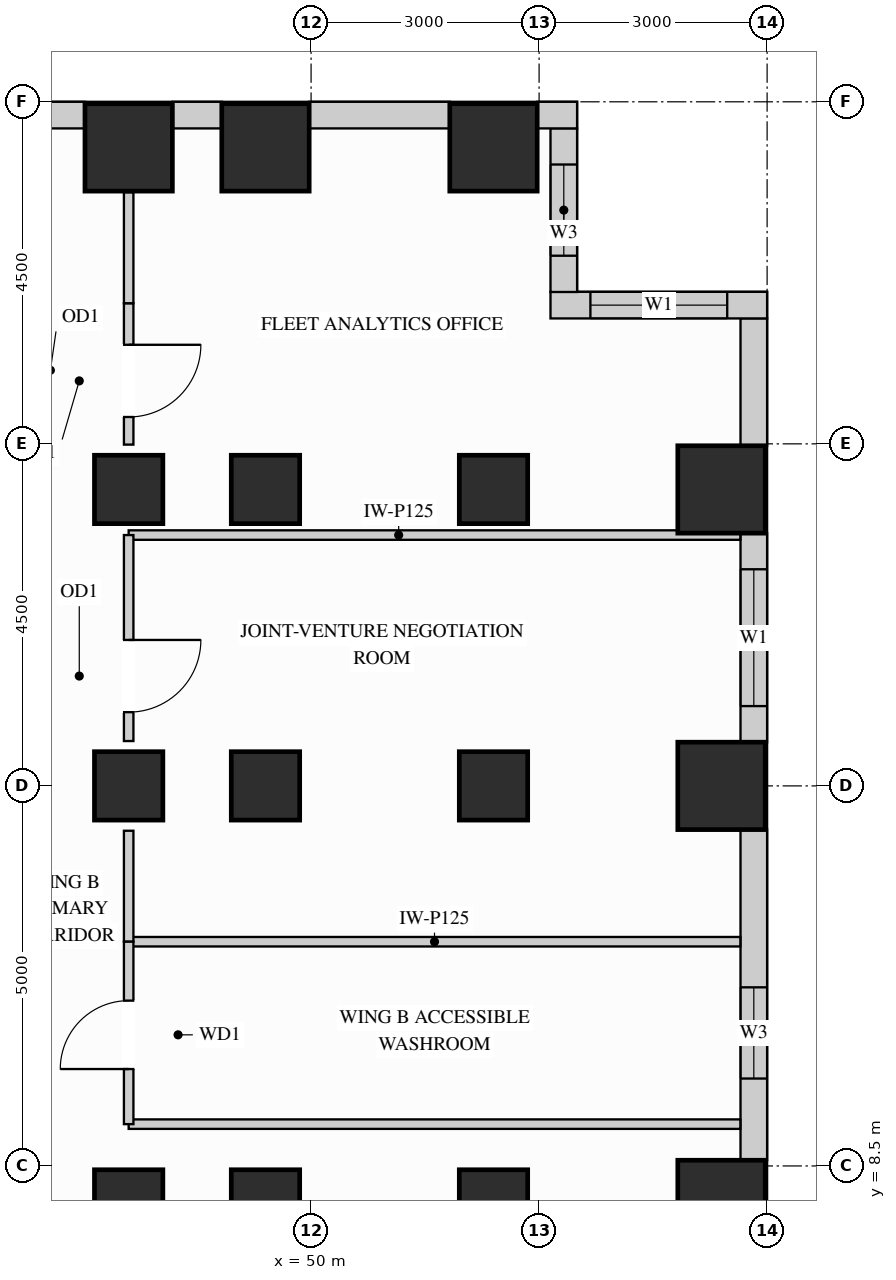
"""IFC4 building model, lengths in metres.
Left out: names, types, materials, properties, quantities, classifications, styles, units other than length and angle.
Written with IfcOpenShell. Run it as: python <this file> out.ifc"""

import sys

from ifc_helpers import new_model, si_unit, direction, frame, frame_2d, origin, origin_2d, place, context, subcontext, project, spatial, rectangle, extrude, source, transform, mapped, element, fill, save


model = new_model("IFC4")
c1 = context("Model", 3, precision=1e-05, world=origin(), true_north=direction((0.0, 1.0)))
c2 = subcontext(c1, "Body", "Model", "MODEL_VIEW")
j1 = project(units=[si_unit("LENGTHUNIT", "METRE"), si_unit("PLANEANGLEUNIT", "RADIAN")], contexts=[c1])
p1 = place(None, origin())
s1 = spatial("IfcSite", under=j1, at=p1, CompositionType="ELEMENT")
p2 = place(p1, origin())
s2 = spatial("IfcBuilding", under=s1, at=p2, CompositionType="ELEMENT")
p3 = place(p2, frame((0.0, 0.0, 124.2)))
s3 = spatial("IfcBuildingStorey", under=s2, at=p3, CompositionType="ELEMENT", Elevation=124.2)
m1 = source(origin(), c2, "Body", "SweptSolid", [
    extrude(rectangle(XDim=0.9, YDim=0.9, at=origin_2d()), origin(), (0.0, 0.0, 1.0), 3.38),
])
for number, where, z_axis, x_axis in (
    (1, (47.6, 13.5, 0.0), (0.0, 0.0, 1.0), (1.0, 0.0, 0.0)),
    (2, (47.6, 8.0, 0.0), (0.0, 0.0, 1.0), (1.0, 0.0, 0.0)),
    (3, (47.6, 17.4, 0.0), (0.0, 0.0, 1.0), (1.0, 0.0, 0.0)),
    (4, (49.4, 13.5, 0.0), (0.0, 0.0, 1.0), (1.0, 0.0, 0.0)),
    (5, (49.4, 17.4, 0.0), (0.0, 0.0, 1.0), (1.0, 0.0, 0.0)),
    (6, (49.4, 8.0, 0.0), (0.0, 0.0, 1.0), (1.0, 0.0, 0.0)),
    (7, (52.4, 13.5, 0.0), (0.0, 0.0, 1.0), (1.0, 0.0, 0.0)),
    (8, (52.4, 17.4, 0.0), (0.0, 0.0, 1.0), (1.0, 0.0, 0.0)),
    (9, (52.4, 8.0, 0.0), (0.0, 0.0, 1.0), (1.0, 0.0, 0.0)),
):
    element("IfcColumn", number, at=place(p3, frame(where, z_axis=z_axis, x_axis=x_axis)), inside=s3, PredefinedType="COLUMN", context=c2, shape_type="MappedRepresentation", body=[
        mapped(m1, transform((0.0, 0.0, 0.0), x_axis=(1.0, 0.0, 0.0), y_axis=(0.0, 1.0, 0.0), z_axis=(0.0, 0.0, 1.0))),
    ])
m2 = source(origin(), c2, "Body", "SweptSolid", [
    extrude(rectangle(XDim=1.15, YDim=1.15, at=origin_2d()), origin(), (0.0, 0.0, 1.0), 3.38),
])
for number, where, z_axis, x_axis in (
    (10, (47.6, 21.9, 0.0), (0.0, 0.0, 1.0), (1.0, 0.0, 0.0)),
    (11, (49.4, 21.9, 0.0), (0.0, 0.0, 1.0), (1.0, 0.0, 0.0)),
    (12, (52.4, 21.9, 0.0), (0.0, 0.0, 1.0), (1.0, 0.0, 0.0)),
    (13, (55.4, 13.5, 0.0), (0.0, 0.0, 1.0), (1.0, 0.0, 0.0)),
    (14, (55.4, 17.4, 0.0), (0.0, 0.0, 1.0), (1.0, 0.0, 0.0)),
    (15, (55.4, 8.0, 0.0), (0.0, 0.0, 1.0), (1.0, 0.0, 0.0)),
):
    element("IfcColumn", number, at=place(p3, frame(where, z_axis=z_axis, x_axis=x_axis)), inside=s3, PredefinedType="COLUMN", context=c2, shape_type="MappedRepresentation", body=[
        mapped(m2, transform((0.0, 0.0, 0.0), x_axis=(1.0, 0.0, 0.0), y_axis=(0.0, 1.0, 0.0), z_axis=(0.0, 0.0, 1.0))),
    ])
p4 = place(p3, frame((55.825, 8.573, 0.0), z_axis=(0.0, 0.0, 1.0), x_axis=(0.0, 1.0, 0.0)))
e16 = element("IfcWall", 16, at=p4, inside=s3, PredefinedType="SOLIDWALL", context=c2, shape_type="SweptSolid", body=[
    extrude(rectangle(XDim=4.354, YDim=0.35, at=frame_2d((2.177, 0.0))), origin(), (0.0, 0.0, 1.0), 3.365),
])
p5 = place(p4, frame((1.077, 0.0, 0.78)))
e17 = element("IfcOpeningElement", 17, at=p5, cuts=e16, PredefinedType="OPENING", context=c2, shape_type="SweptSolid", body=[
    extrude(rectangle(XDim=1.2, YDim=2.1, at=frame_2d((0.6, 1.05))), frame((0.0, 0.185, 0.0), z_axis=(0.0, -1.0, 0.0), x_axis=(1.0, 0.0, 0.0)), (0.0, 0.0, 1.0), 0.37),
])
p6 = place(p3, frame((55.825, 14.073, 0.0), z_axis=(0.0, 0.0, 1.0), x_axis=(0.0, 1.0, 0.0)))
e18 = element("IfcWall", 18, at=p6, inside=s3, PredefinedType="SOLIDWALL", context=c2, shape_type="SweptSolid", body=[
    extrude(rectangle(XDim=2.754, YDim=0.35, at=frame_2d((1.377, 0.0))), origin(), (0.0, 0.0, 1.0), 3.365),
])
p7 = place(p6, frame((0.477, 0.0, 0.78)))
e19 = element("IfcOpeningElement", 19, at=p7, cuts=e18, PredefinedType="OPENING", context=c2, shape_type="SweptSolid", body=[
    extrude(rectangle(XDim=1.8, YDim=2.1, at=frame_2d((0.9, 1.05))), frame((0.0, 0.185, 0.0), z_axis=(0.0, -1.0, 0.0), x_axis=(1.0, 0.0, 0.0)), (0.0, 0.0, 1.0), 0.37),
])
m3 = source(origin(), c2, "Body", "SweptSolid", [
    extrude(rectangle(XDim=1.679, YDim=0.35, at=frame_2d((0.84, 0.0))), origin(), (0.0, 0.0, 1.0), 3.365),
])
p8 = place(p3, frame((55.825, 17.973, 0.0), z_axis=(0.0, 0.0, 1.0), x_axis=(0.0, 1.0, 0.0)))
e20 = element("IfcWall", 20, at=p8, inside=s3, PredefinedType="SOLIDWALL", context=c2, shape_type="MappedRepresentation", body=[
    mapped(m3, transform((0.0, 0.0, 0.0), x_axis=(1.0, 0.0, 0.0), y_axis=(0.0, 1.0, 0.0), z_axis=(0.0, 0.0, 1.0))),
])
p9 = place(p3, frame((56.0, 19.825, 0.0), z_axis=(0.0, 0.0, 1.0), x_axis=(-1.0, 0.0, 0.0)))
e21 = element("IfcWall", 21, at=p9, inside=s3, PredefinedType="SOLIDWALL", context=c2, shape_type="SweptSolid", body=[
    extrude(rectangle(XDim=2.85, YDim=0.35, at=frame_2d((1.425, 0.0))), origin(), (0.0, 0.0, 1.0), 3.365),
])
p10 = place(p9, frame((0.525, 0.0, 0.78)))
e22 = element("IfcOpeningElement", 22, at=p10, cuts=e21, PredefinedType="OPENING", context=c2, shape_type="SweptSolid", body=[
    extrude(rectangle(XDim=1.8, YDim=2.1, at=frame_2d((0.9, 1.05))), frame((0.0, 0.185, 0.0), z_axis=(0.0, -1.0, 0.0), x_axis=(1.0, 0.0, 0.0)), (0.0, 0.0, 1.0), 0.37),
])
p11 = place(p3, frame((53.325, 19.998, 0.0), z_axis=(0.0, 0.0, 1.0), x_axis=(0.0, 1.0, 0.0)))
e23 = element("IfcWall", 23, at=p11, inside=s3, PredefinedType="SOLIDWALL", context=c2, shape_type="SweptSolid", body=[
    extrude(rectangle(XDim=2.154, YDim=0.35, at=frame_2d((1.077, 0.0))), origin(), (0.0, 0.0, 1.0), 3.365),
])
p12 = place(p11, frame((0.477, 0.0, 0.78)))
e24 = element("IfcOpeningElement", 24, at=p12, cuts=e23, PredefinedType="OPENING", context=c2, shape_type="SweptSolid", body=[
    extrude(rectangle(XDim=1.2, YDim=2.1, at=frame_2d((0.6, 1.05))), frame((0.0, 0.185, 0.0), z_axis=(0.0, -1.0, 0.0), x_axis=(1.0, 0.0, 0.0)), (0.0, 0.0, 1.0), 0.37),
])
m4 = source(origin(), c2, "Body", "SweptSolid", [
    extrude(rectangle(XDim=0.527, YDim=0.35, at=frame_2d((0.264, 0.0))), origin(), (0.0, 0.0, 1.0), 3.365),
])
p13 = place(p3, frame((53.5, 22.325, 0.0), z_axis=(0.0, 0.0, 1.0), x_axis=(-1.0, 0.0, 0.0)))
e25 = element("IfcWall", 25, at=p13, inside=s3, PredefinedType="SOLIDWALL", context=c2, shape_type="MappedRepresentation", body=[
    mapped(m4, transform((0.0, 0.0, 0.0), x_axis=(1.0, 0.0, 0.0), y_axis=(0.0, 1.0, 0.0), z_axis=(0.0, 0.0, 1.0))),
])
m5 = source(origin(), c2, "Body", "SweptSolid", [
    extrude(rectangle(XDim=1.854, YDim=0.35, at=frame_2d((0.927, 0.0))), origin(), (0.0, 0.0, 1.0), 3.365),
])
p14 = place(p3, frame((51.827, 22.325, 0.0), z_axis=(0.0, 0.0, 1.0), x_axis=(-1.0, 0.0, 0.0)))
e26 = element("IfcWall", 26, at=p14, inside=s3, PredefinedType="SOLIDWALL", context=c2, shape_type="MappedRepresentation", body=[
    mapped(m5, transform((0.0, 0.0, 0.0), x_axis=(1.0, 0.0, 0.0), y_axis=(0.0, 1.0, 0.0), z_axis=(0.0, 0.0, 1.0))),
])
m6 = source(origin(), c2, "Body", "SweptSolid", [
    extrude(rectangle(XDim=0.654, YDim=0.35, at=frame_2d((0.327, 0.0))), origin(), (0.0, 0.0, 1.0), 3.365),
])
p15 = place(p3, frame((48.827, 22.325, 0.0), z_axis=(0.0, 0.0, 1.0), x_axis=(-1.0, 0.0, 0.0)))
e27 = element("IfcWall", 27, at=p15, inside=s3, PredefinedType="SOLIDWALL", context=c2, shape_type="MappedRepresentation", body=[
    mapped(m6, transform((0.0, 0.0, 0.0), x_axis=(1.0, 0.0, 0.0), y_axis=(0.0, 1.0, 0.0), z_axis=(0.0, 0.0, 1.0))),
])
p16 = place(p3, frame((47.027, 22.325, 0.0), z_axis=(0.0, 0.0, 1.0), x_axis=(-1.0, 0.0, 0.0)))
e28 = element("IfcWall", 28, at=p16, inside=s3, PredefinedType="SOLIDWALL", context=c2, shape_type="SweptSolid", body=[
    extrude(rectangle(XDim=6.454, YDim=0.35, at=frame_2d((3.227, 0.0))), origin(), (0.0, 0.0, 1.0), 3.365),
])
p17 = place(p16, frame((1.749, 0.0, 0.78)))
e29 = element("IfcOpeningElement", 29, at=p17, cuts=e28, PredefinedType="OPENING", context=c2, shape_type="SweptSolid", body=[
    extrude(rectangle(XDim=1.8, YDim=2.1, at=frame_2d((0.9, 1.05))), frame((0.0, 0.185, 0.0), z_axis=(0.0, -1.0, 0.0), x_axis=(1.0, 0.0, 0.0)), (0.0, 0.0, 1.0), 0.37),
])
p18 = place(p16, frame((3.942, 0.0, 0.78)))
e30 = element("IfcOpeningElement", 30, at=p18, cuts=e28, PredefinedType="OPENING", context=c2, shape_type="SweptSolid", body=[
    extrude(rectangle(XDim=1.8, YDim=2.1, at=frame_2d((0.9, 1.05))), frame((0.0, 0.185, 0.0), z_axis=(0.0, -1.0, 0.0), x_axis=(1.0, 0.0, 0.0)), (0.0, 0.0, 1.0), 0.37),
])
m7 = source(origin(), c2, "Body", "SweptSolid", [
    extrude(rectangle(XDim=8.048, YDim=0.125, at=frame_2d((4.024, 0.0))), origin(), (0.0, 0.0, 1.0), 3.365),
])
for number, where, z_axis, x_axis in (
    (31, (47.6, 11.45, 0.0), (0.0, 0.0, 1.0), (1.0, 0.0, 0.0)),
    (32, (47.6, 16.8, 0.0), (0.0, 0.0, 1.0), (1.0, 0.0, 0.0)),
    (33, (47.6, 9.05, 0.0), (0.0, 0.0, 1.0), (1.0, 0.0, 0.0)),
):
    element("IfcWall", number, at=place(p3, frame(where, z_axis=z_axis, x_axis=x_axis)), inside=s3, PredefinedType="PARTITIONING", context=c2, shape_type="MappedRepresentation", body=[
        mapped(m7, transform((0.0, 0.0, 0.0), x_axis=(1.0, 0.0, 0.0), y_axis=(0.0, 1.0, 0.0), z_axis=(0.0, 0.0, 1.0))),
    ])
m8 = source(origin(), c2, "Body", "SweptSolid", [
    extrude(rectangle(XDim=1.46, YDim=0.125, at=frame_2d((0.73, 0.0))), origin(), (0.0, 0.0, 1.0), 2.677),
])
p19 = place(p3, frame((47.6, 11.45, 0.0), z_axis=(0.0, 0.0, 1.0), x_axis=(0.0, 1.0, 0.0)))
e34 = element("IfcWall", 34, at=p19, inside=s3, PredefinedType="PARTITIONING", context=c2, shape_type="MappedRepresentation", body=[
    mapped(m8, transform((0.0, 0.0, 0.0), x_axis=(1.0, 0.0, 0.0), y_axis=(0.0, 1.0, 0.0), z_axis=(0.0, 0.0, 1.0))),
])
p20 = place(p3, frame((47.6, 14.09, 0.0), z_axis=(0.0, 0.0, 1.0), x_axis=(0.0, 1.0, 0.0)))
e35 = element("IfcWall", 35, at=p20, inside=s3, PredefinedType="PARTITIONING", context=c2, shape_type="SweptSolid", body=[
    extrude(rectangle(XDim=2.71, YDim=0.125, at=frame_2d((1.355, 0.0))), origin(), (0.0, 0.0, 1.0), 2.677),
])
p21 = place(p20, frame((0.38, 0.0, 0.0)))
e36 = element("IfcOpeningElement", 36, at=p21, cuts=e35, PredefinedType="OPENING", context=c2, shape_type="SweptSolid", body=[
    extrude(rectangle(XDim=0.95, YDim=2.15, at=frame_2d((0.475, 1.075))), frame((0.0, 0.073, 0.0), z_axis=(0.0, -1.0, 0.0), x_axis=(1.0, 0.0, 0.0)), (0.0, 0.0, 1.0), 0.145),
])
p22 = place(p3, frame((47.6, 17.99, 0.0), z_axis=(0.0, 0.0, 1.0), x_axis=(0.0, 1.0, 0.0)))
e37 = element("IfcWall", 37, at=p22, inside=s3, PredefinedType="PARTITIONING", context=c2, shape_type="SweptSolid", body=[
    extrude(rectangle(XDim=1.86, YDim=0.125, at=frame_2d((0.93, 0.0))), origin(), (0.0, 0.0, 1.0), 2.677),
])
p23 = place(p22, frame((0.363, 0.0, 0.0)))
e38 = element("IfcOpeningElement", 38, at=p23, cuts=e37, PredefinedType="OPENING", context=c2, shape_type="SweptSolid", body=[
    extrude(rectangle(XDim=0.95, YDim=2.15, at=frame_2d((0.475, 1.075))), frame((0.0, 0.073, 0.0), z_axis=(0.0, -1.0, 0.0), x_axis=(1.0, 0.0, 0.0)), (0.0, 0.0, 1.0), 0.145),
])
p24 = place(p3, frame((47.6, 19.85, 0.0), z_axis=(0.0, 0.0, 1.0), x_axis=(0.0, 1.0, 0.0)))
e39 = element("IfcWall", 39, at=p24, inside=s3, PredefinedType="PARTITIONING", context=c2, shape_type="MappedRepresentation", body=[
    mapped(m8, transform((0.0, 0.0, 0.0), x_axis=(1.0, 0.0, 0.0), y_axis=(0.0, 1.0, 0.0), z_axis=(0.0, 0.0, 1.0))),
])
p25 = place(p3, frame((47.6, 9.05, 0.0), z_axis=(0.0, 0.0, 1.0), x_axis=(0.0, 1.0, 0.0)))
e40 = element("IfcWall", 40, at=p25, inside=s3, PredefinedType="PARTITIONING", context=c2, shape_type="SweptSolid", body=[
    extrude(rectangle(XDim=2.4, YDim=0.125, at=frame_2d((1.2, 0.0))), origin(), (0.0, 0.0, 1.0), 2.677),
])
p26 = place(p25, frame((0.725, 0.0, 0.0)))
e41 = element("IfcOpeningElement", 41, at=p26, cuts=e40, PredefinedType="OPENING", context=c2, shape_type="SweptSolid", body=[
    extrude(rectangle(XDim=0.9, YDim=2.15, at=frame_2d((0.45, 1.075))), frame((0.0, 0.073, 0.0), z_axis=(0.0, -1.0, 0.0), x_axis=(1.0, 0.0, 0.0)), (0.0, 0.0, 1.0), 0.145),
])
m9 = source(origin(), c2, "Body", "SweptSolid", [
    extrude(rectangle(XDim=0.95, YDim=2.15, at=frame_2d((0.475, 1.075))), frame((0.0, 0.025, 0.0), z_axis=(0.0, -1.0, 0.0), x_axis=(1.0, 0.0, 0.0)), (0.0, 0.0, 1.0), 0.05),
])
p27 = place(p21, origin())
e42 = element("IfcDoor", 42, at=p27, inside=s3, OperationType="SINGLE_SWING_RIGHT", PredefinedType="DOOR", context=c2, shape_type="MappedRepresentation", body=[
    mapped(m9, transform((0.0, 0.0, 0.0), x_axis=(1.0, 0.0, 0.0), y_axis=(0.0, 1.0, 0.0), z_axis=(0.0, 0.0, 1.0))),
])
fill(e36, e42)
p28 = place(p23, origin())
e43 = element("IfcDoor", 43, at=p28, inside=s3, OperationType="SINGLE_SWING_RIGHT", PredefinedType="DOOR", context=c2, shape_type="MappedRepresentation", body=[
    mapped(m9, transform((0.0, 0.0, 0.0), x_axis=(1.0, 0.0, 0.0), y_axis=(0.0, 1.0, 0.0), z_axis=(0.0, 0.0, 1.0))),
])
fill(e38, e43)
m10 = source(origin(), c2, "Body", "SweptSolid", [
    extrude(rectangle(XDim=0.9, YDim=2.15, at=frame_2d((0.45, 1.075))), frame((0.0, 0.025, 0.0), z_axis=(0.0, -1.0, 0.0), x_axis=(1.0, 0.0, 0.0)), (0.0, 0.0, 1.0), 0.05),
])
p29 = place(p26, origin())
e44 = element("IfcDoor", 44, at=p29, inside=s3, OperationType="SINGLE_SWING_LEFT", PredefinedType="DOOR", context=c2, shape_type="MappedRepresentation", body=[
    mapped(m10, transform((0.0, 0.0, 0.0), x_axis=(1.0, 0.0, 0.0), y_axis=(0.0, 1.0, 0.0), z_axis=(0.0, 0.0, 1.0))),
])
fill(e41, e44)
m11 = source(origin(), c2, "Body", "SweptSolid", [
    extrude(rectangle(XDim=1.8, YDim=2.1, at=frame_2d((0.9, 1.05))), frame((0.0, 0.03, 0.0), z_axis=(0.0, -1.0, 0.0), x_axis=(1.0, 0.0, 0.0)), (0.0, 0.0, 1.0), 0.06),
])
p30 = place(p7, origin())
e45 = element("IfcWindow", 45, at=p30, inside=s3, PartitioningType="SINGLE_PANEL", PredefinedType="WINDOW", context=c2, shape_type="MappedRepresentation", body=[
    mapped(m11, transform((0.0, 0.0, 0.0), x_axis=(1.0, 0.0, 0.0), y_axis=(0.0, 1.0, 0.0), z_axis=(0.0, 0.0, 1.0))),
])
fill(e19, e45)
p31 = place(p10, origin())
e46 = element("IfcWindow", 46, at=p31, inside=s3, PartitioningType="SINGLE_PANEL", PredefinedType="WINDOW", context=c2, shape_type="MappedRepresentation", body=[
    mapped(m11, transform((0.0, 0.0, 0.0), x_axis=(1.0, 0.0, 0.0), y_axis=(0.0, 1.0, 0.0), z_axis=(0.0, 0.0, 1.0))),
])
fill(e22, e46)
m12 = source(origin(), c2, "Body", "SweptSolid", [
    extrude(rectangle(XDim=1.2, YDim=2.1, at=frame_2d((0.6, 1.05))), frame((0.0, 0.03, 0.0), z_axis=(0.0, -1.0, 0.0), x_axis=(1.0, 0.0, 0.0)), (0.0, 0.0, 1.0), 0.06),
])
p32 = place(p5, origin())
e47 = element("IfcWindow", 47, at=p32, inside=s3, PartitioningType="SINGLE_PANEL", PredefinedType="WINDOW", context=c2, shape_type="MappedRepresentation", body=[
    mapped(m12, transform((0.0, 0.0, 0.0), x_axis=(1.0, 0.0, 0.0), y_axis=(0.0, 1.0, 0.0), z_axis=(0.0, 0.0, 1.0))),
])
fill(e17, e47)
p33 = place(p12, origin())
e48 = element("IfcWindow", 48, at=p33, inside=s3, PartitioningType="SINGLE_PANEL", PredefinedType="WINDOW", context=c2, shape_type="MappedRepresentation", body=[
    mapped(m12, transform((0.0, 0.0, 0.0), x_axis=(1.0, 0.0, 0.0), y_axis=(0.0, 1.0, 0.0), z_axis=(0.0, 0.0, 1.0))),
])
fill(e24, e48)
save(model, sys.argv[1])
